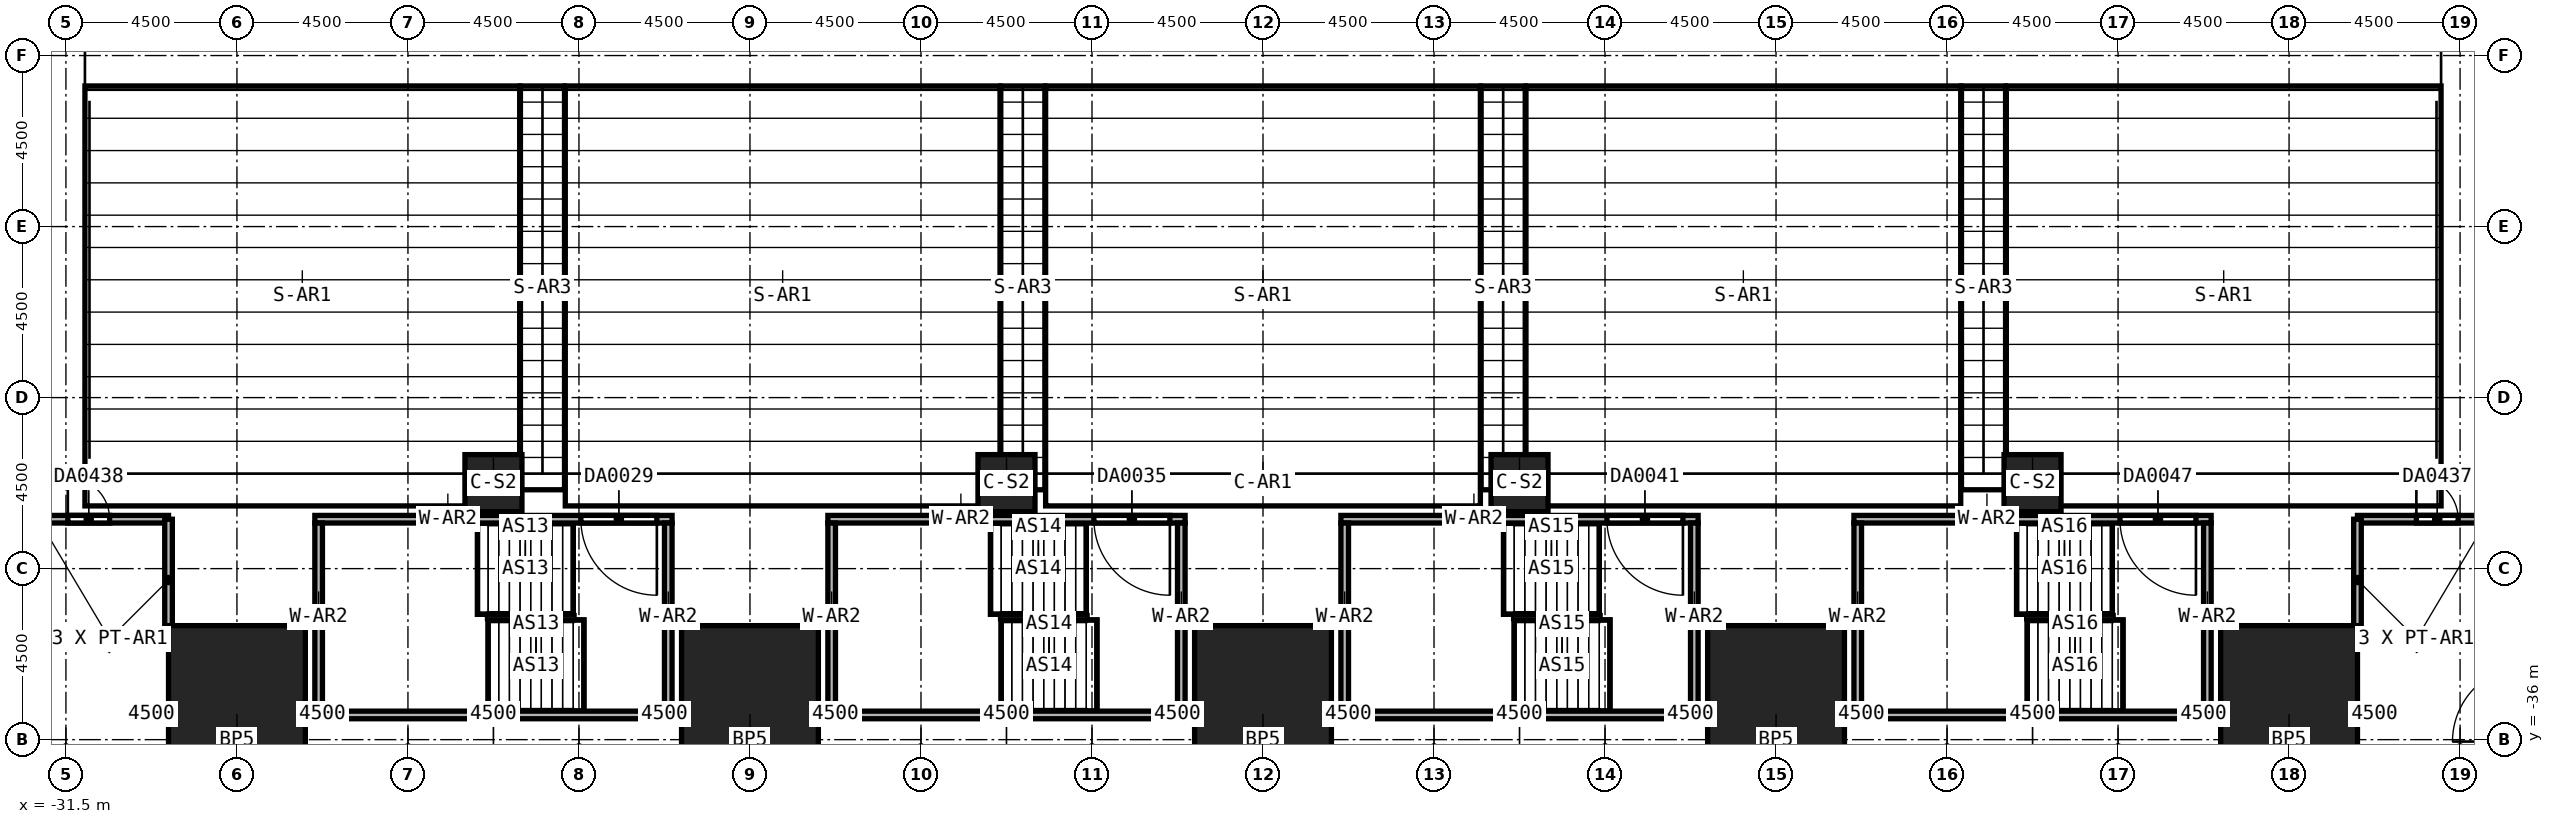
"""IFC4 building model, lengths in metres.
Left out: names, types, materials, properties, quantities, classifications, styles, units other than length and angle.
Written with IfcOpenShell. Run it as: python <this file> out.ifc"""

import sys

from ifc_helpers import new_model, si_unit, direction, frame, frame_2d, origin, origin_2d, place, context, subcontext, project, spatial, rectangle, hollow_rectangle, extrude, element, fill, save


model = new_model("IFC4")
c1 = context("Model", 3, precision=1e-05, world=origin(), true_north=direction((0.0, 1.0)))
c2 = subcontext(c1, "Body", "Model", "MODEL_VIEW")
j1 = project(units=[si_unit("LENGTHUNIT", "METRE"), si_unit("PLANEANGLEUNIT", "RADIAN")], contexts=[c1])
p1 = place(None, origin())
s1 = spatial("IfcSite", under=j1, at=p1, CompositionType="ELEMENT")
p2 = place(p1, origin())
s2 = spatial("IfcBuilding", under=s1, at=p2, CompositionType="ELEMENT")
p3 = place(p2, frame((0.0, 0.0, 31.0)))
s3 = spatial("IfcBuildingStorey", under=s2, at=p3, CompositionType="ELEMENT", Elevation=31.0)
for number, where, z_axis, x_axis in (
    (1, (-27.0, -36.0, 0.0), (0.0, 0.0, 1.0), (1.0, 0.0, 0.0)),
    (2, (-13.5, -36.0, 0.0), (0.0, 0.0, 1.0), (1.0, 0.0, 0.0)),
    (3, (0.0, -36.0, 0.0), (0.0, 0.0, 1.0), (1.0, 0.0, 0.0)),
    (4, (13.5, -36.0, 0.0), (0.0, 0.0, 1.0), (1.0, 0.0, 0.0)),
    (5, (27.0, -36.0, 0.0), (0.0, 0.0, 1.0), (1.0, 0.0, 0.0)),
):
    element("IfcColumn", number, at=place(p3, frame(where, z_axis=z_axis, x_axis=x_axis)), inside=s3, PredefinedType="COLUMN", context=c2, shape_type="SweptSolid", body=[
        extrude(rectangle(XDim=3.6, YDim=6.0, at=origin_2d()), origin(), (0.0, 0.0, 1.0), 6.0),
    ])
for number, where, z_axis, x_axis in (
    (6, (-20.25, -29.25, 0.0), (0.0, 0.0, 1.0), (1.0, 0.0, 0.0)),
    (7, (-6.75, -29.25, 0.0), (0.0, 0.0, 1.0), (1.0, 0.0, 0.0)),
    (8, (6.75, -29.25, 0.0), (0.0, 0.0, 1.0), (1.0, 0.0, 0.0)),
    (9, (20.25, -29.25, 0.0), (0.0, 0.0, 1.0), (1.0, 0.0, 0.0)),
):
    element("IfcColumn", number, at=place(p3, frame(where, z_axis=z_axis, x_axis=x_axis)), inside=s3, PredefinedType="COLUMN", context=c2, shape_type="SweptSolid", body=[
        extrude(rectangle(XDim=1.5, YDim=1.5, at=origin_2d()), origin(), (0.0, 0.0, 1.0), 6.0),
    ])
p4 = place(p3, frame((0.0, -29.255, 0.0), z_axis=(0.0, 0.0, 1.0), x_axis=(1.0, 0.0, 0.0)))
e10 = element("IfcColumn", 10, at=p4, inside=s3, PredefinedType="COLUMN", context=c2, shape_type="SweptSolid", body=[
    extrude(hollow_rectangle(XDim=0.5, YDim=0.6, WallThickness=0.03, at=origin_2d()), origin(), (0.0, 0.0, 1.0), 5.7),
])
p5 = place(p3, frame((-15.55, -30.2, 0.0), z_axis=(0.0, 0.0, 1.0), x_axis=(-1.0, 0.0, 0.0)))
e11 = element("IfcWall", 11, at=p5, inside=s3, PredefinedType="SOLIDWALL", context=c2, shape_type="SweptSolid", body=[
    extrude(rectangle(XDim=9.4, YDim=0.2, at=frame_2d((4.7, 0.0))), origin(), (0.0, 0.0, 1.0), 6.0),
])
p6 = place(p5, frame((0.4, 0.0, 0.0)))
e12 = element("IfcOpeningElement", 12, at=p6, cuts=e11, PredefinedType="OPENING", context=c2, shape_type="SweptSolid", body=[
    extrude(rectangle(XDim=2.0, YDim=2.4, at=frame_2d((1.0, 1.2))), frame((0.0, 0.1, 0.0), z_axis=(0.0, -1.0, 0.0), x_axis=(1.0, 0.0, 0.0)), (0.0, 0.0, 1.0), 0.2),
])
p7 = place(p3, frame((-24.95, -35.35, 0.0), z_axis=(0.0, 0.0, 1.0), x_axis=(1.0, 0.0, 0.0)))
e13 = element("IfcWall", 13, at=p7, inside=s3, PredefinedType="SOLIDWALL", context=c2, shape_type="SweptSolid", body=[
    extrude(rectangle(XDim=9.4, YDim=0.2, at=frame_2d((4.7, 0.0))), origin(), (0.0, 0.0, 1.0), 6.0),
])
for number, where, z_axis, x_axis in (
    (14, (-24.85, -35.25, 0.0), (0.0, 0.0, 1.0), (0.0, 1.0, 0.0)),
    (15, (-15.65, -35.25, 0.0), (0.0, 0.0, 1.0), (0.0, 1.0, 0.0)),
):
    element("IfcWall", number, at=place(p3, frame(where, z_axis=z_axis, x_axis=x_axis)), inside=s3, PredefinedType="SOLIDWALL", context=c2, shape_type="SweptSolid", body=[
        extrude(rectangle(XDim=4.95, YDim=0.2, at=frame_2d((2.475, 0.0))), origin(), (0.0, 0.0, 1.0), 6.0),
    ])
p8 = place(p3, frame((-2.05, -30.2, 0.0), z_axis=(0.0, 0.0, 1.0), x_axis=(-1.0, 0.0, 0.0)))
e16 = element("IfcWall", 16, at=p8, inside=s3, PredefinedType="SOLIDWALL", context=c2, shape_type="SweptSolid", body=[
    extrude(rectangle(XDim=9.4, YDim=0.2, at=frame_2d((4.7, 0.0))), origin(), (0.0, 0.0, 1.0), 6.0),
])
p9 = place(p8, frame((0.4, 0.0, 0.0)))
e17 = element("IfcOpeningElement", 17, at=p9, cuts=e16, PredefinedType="OPENING", context=c2, shape_type="SweptSolid", body=[
    extrude(rectangle(XDim=2.0, YDim=2.4, at=frame_2d((1.0, 1.2))), frame((0.0, 0.1, 0.0), z_axis=(0.0, -1.0, 0.0), x_axis=(1.0, 0.0, 0.0)), (0.0, 0.0, 1.0), 0.2),
])
p10 = place(p3, frame((-11.45, -35.35, 0.0), z_axis=(0.0, 0.0, 1.0), x_axis=(1.0, 0.0, 0.0)))
e18 = element("IfcWall", 18, at=p10, inside=s3, PredefinedType="SOLIDWALL", context=c2, shape_type="SweptSolid", body=[
    extrude(rectangle(XDim=9.4, YDim=0.2, at=frame_2d((4.7, 0.0))), origin(), (0.0, 0.0, 1.0), 6.0),
])
for number, where, z_axis, x_axis in (
    (19, (-11.35, -35.25, 0.0), (0.0, 0.0, 1.0), (0.0, 1.0, 0.0)),
    (20, (-2.15, -35.25, 0.0), (0.0, 0.0, 1.0), (0.0, 1.0, 0.0)),
):
    element("IfcWall", number, at=place(p3, frame(where, z_axis=z_axis, x_axis=x_axis)), inside=s3, PredefinedType="SOLIDWALL", context=c2, shape_type="SweptSolid", body=[
        extrude(rectangle(XDim=4.95, YDim=0.2, at=frame_2d((2.475, 0.0))), origin(), (0.0, 0.0, 1.0), 6.0),
    ])
p11 = place(p3, frame((11.45, -30.2, 0.0), z_axis=(0.0, 0.0, 1.0), x_axis=(-1.0, 0.0, 0.0)))
e21 = element("IfcWall", 21, at=p11, inside=s3, PredefinedType="SOLIDWALL", context=c2, shape_type="SweptSolid", body=[
    extrude(rectangle(XDim=9.4, YDim=0.2, at=frame_2d((4.7, 0.0))), origin(), (0.0, 0.0, 1.0), 6.0),
])
p12 = place(p11, frame((0.4, 0.0, 0.0)))
e22 = element("IfcOpeningElement", 22, at=p12, cuts=e21, PredefinedType="OPENING", context=c2, shape_type="SweptSolid", body=[
    extrude(rectangle(XDim=2.0, YDim=2.4, at=frame_2d((1.0, 1.2))), frame((0.0, 0.1, 0.0), z_axis=(0.0, -1.0, 0.0), x_axis=(1.0, 0.0, 0.0)), (0.0, 0.0, 1.0), 0.2),
])
p13 = place(p3, frame((2.05, -35.35, 0.0), z_axis=(0.0, 0.0, 1.0), x_axis=(1.0, 0.0, 0.0)))
e23 = element("IfcWall", 23, at=p13, inside=s3, PredefinedType="SOLIDWALL", context=c2, shape_type="SweptSolid", body=[
    extrude(rectangle(XDim=9.4, YDim=0.2, at=frame_2d((4.7, 0.0))), origin(), (0.0, 0.0, 1.0), 6.0),
])
for number, where, z_axis, x_axis in (
    (24, (2.15, -35.25, 0.0), (0.0, 0.0, 1.0), (0.0, 1.0, 0.0)),
    (25, (11.35, -35.25, 0.0), (0.0, 0.0, 1.0), (0.0, 1.0, 0.0)),
):
    element("IfcWall", number, at=place(p3, frame(where, z_axis=z_axis, x_axis=x_axis)), inside=s3, PredefinedType="SOLIDWALL", context=c2, shape_type="SweptSolid", body=[
        extrude(rectangle(XDim=4.95, YDim=0.2, at=frame_2d((2.475, 0.0))), origin(), (0.0, 0.0, 1.0), 6.0),
    ])
p14 = place(p3, frame((24.95, -30.2, 0.0), z_axis=(0.0, 0.0, 1.0), x_axis=(-1.0, 0.0, 0.0)))
e26 = element("IfcWall", 26, at=p14, inside=s3, PredefinedType="SOLIDWALL", context=c2, shape_type="SweptSolid", body=[
    extrude(rectangle(XDim=9.4, YDim=0.2, at=frame_2d((4.7, 0.0))), origin(), (0.0, 0.0, 1.0), 6.0),
])
p15 = place(p14, frame((0.4, 0.0, 0.0)))
e27 = element("IfcOpeningElement", 27, at=p15, cuts=e26, PredefinedType="OPENING", context=c2, shape_type="SweptSolid", body=[
    extrude(rectangle(XDim=2.0, YDim=2.4, at=frame_2d((1.0, 1.2))), frame((0.0, 0.1, 0.0), z_axis=(0.0, -1.0, 0.0), x_axis=(1.0, 0.0, 0.0)), (0.0, 0.0, 1.0), 0.2),
])
p16 = place(p3, frame((15.55, -35.35, 0.0), z_axis=(0.0, 0.0, 1.0), x_axis=(1.0, 0.0, 0.0)))
e28 = element("IfcWall", 28, at=p16, inside=s3, PredefinedType="SOLIDWALL", context=c2, shape_type="SweptSolid", body=[
    extrude(rectangle(XDim=9.4, YDim=0.2, at=frame_2d((4.7, 0.0))), origin(), (0.0, 0.0, 1.0), 6.0),
])
for number, where, z_axis, x_axis in (
    (29, (15.65, -35.25, 0.0), (0.0, 0.0, 1.0), (0.0, 1.0, 0.0)),
    (30, (24.85, -35.25, 0.0), (0.0, 0.0, 1.0), (0.0, 1.0, 0.0)),
):
    element("IfcWall", number, at=place(p3, frame(where, z_axis=z_axis, x_axis=x_axis)), inside=s3, PredefinedType="SOLIDWALL", context=c2, shape_type="SweptSolid", body=[
        extrude(rectangle(XDim=4.95, YDim=0.2, at=frame_2d((2.475, 0.0))), origin(), (0.0, 0.0, 1.0), 6.0),
    ])
p17 = place(p3, frame((28.8, -30.2, 0.0), z_axis=(0.0, 0.0, 1.0), x_axis=(1.0, 0.0, 0.0)))
e31 = element("IfcWall", 31, at=p17, inside=s3, PredefinedType="PARTITIONING", context=c2, shape_type="SweptSolid", body=[
    extrude(rectangle(XDim=4.2, YDim=0.2, at=frame_2d((2.1, 0.0))), origin(), (0.0, 0.0, 1.0), 5.7),
])
p18 = place(p17, frame((1.55, 0.0, 0.0)))
e32 = element("IfcOpeningElement", 32, at=p18, cuts=e31, PredefinedType="OPENING", context=c2, shape_type="SweptSolid", body=[
    extrude(rectangle(XDim=1.1, YDim=2.4, at=frame_2d((0.55, 1.2))), frame((0.0, 0.1, 0.0), z_axis=(0.0, -1.0, 0.0), x_axis=(1.0, 0.0, 0.0)), (0.0, 0.0, 1.0), 0.2),
])
p19 = place(p3, frame((28.8, -33.4, 0.0), z_axis=(0.0, 0.0, 1.0), x_axis=(0.0, 1.0, 0.0)))
e33 = element("IfcWall", 33, at=p19, inside=s3, PredefinedType="PARTITIONING", context=c2, shape_type="SweptSolid", body=[
    extrude(rectangle(XDim=3.2, YDim=0.2, at=frame_2d((1.6, 0.0))), origin(), (0.0, 0.0, 1.0), 5.7),
])
p20 = place(p3, frame((28.8, -33.4, 0.0), z_axis=(0.0, 0.0, 1.0), x_axis=(1.0, 0.0, 0.0)))
e34 = element("IfcWall", 34, at=p20, inside=s3, PredefinedType="PARTITIONING", context=c2, shape_type="SweptSolid", body=[
    extrude(rectangle(XDim=4.2, YDim=0.2, at=frame_2d((2.1, 0.0))), origin(), (0.0, 0.0, 1.0), 5.7),
])
p21 = place(p3, frame((-33.0, -30.2, 0.0), z_axis=(0.0, 0.0, 1.0), x_axis=(1.0, 0.0, 0.0)))
e35 = element("IfcWall", 35, at=p21, inside=s3, PredefinedType="PARTITIONING", context=c2, shape_type="SweptSolid", body=[
    extrude(rectangle(XDim=4.2, YDim=0.2, at=frame_2d((2.1, 0.0))), origin(), (0.0, 0.0, 1.0), 5.7),
])
p22 = place(p21, frame((1.55, 0.0, 0.0)))
e36 = element("IfcOpeningElement", 36, at=p22, cuts=e35, PredefinedType="OPENING", context=c2, shape_type="SweptSolid", body=[
    extrude(rectangle(XDim=1.1, YDim=2.4, at=frame_2d((0.55, 1.2))), frame((0.0, 0.1, 0.0), z_axis=(0.0, -1.0, 0.0), x_axis=(1.0, 0.0, 0.0)), (0.0, 0.0, 1.0), 0.2),
])
p23 = place(p3, frame((-28.8, -33.4, 0.0), z_axis=(0.0, 0.0, 1.0), x_axis=(0.0, 1.0, 0.0)))
e37 = element("IfcWall", 37, at=p23, inside=s3, PredefinedType="PARTITIONING", context=c2, shape_type="SweptSolid", body=[
    extrude(rectangle(XDim=3.2, YDim=0.2, at=frame_2d((1.6, 0.0))), origin(), (0.0, 0.0, 1.0), 5.7),
])
p24 = place(p3, frame((-33.0, -33.4, 0.0), z_axis=(0.0, 0.0, 1.0), x_axis=(1.0, 0.0, 0.0)))
e38 = element("IfcWall", 38, at=p24, inside=s3, PredefinedType="PARTITIONING", context=c2, shape_type="SweptSolid", body=[
    extrude(rectangle(XDim=4.2, YDim=0.2, at=frame_2d((2.1, 0.0))), origin(), (0.0, 0.0, 1.0), 5.7),
])
p25 = place(p6, origin())
e39 = element("IfcDoor", 39, at=p25, inside=s3, OperationType="DOUBLE_DOOR_SINGLE_SWING", PredefinedType="DOOR", context=c2, shape_type="SweptSolid", body=[
    extrude(rectangle(XDim=2.0, YDim=2.4, at=frame_2d((1.0, 1.2))), frame((0.0, 0.025, 0.0), z_axis=(0.0, -1.0, 0.0), x_axis=(1.0, 0.0, 0.0)), (0.0, 0.0, 1.0), 0.05),
])
fill(e12, e39)
p26 = place(p9, origin())
e40 = element("IfcDoor", 40, at=p26, inside=s3, OperationType="DOUBLE_DOOR_SINGLE_SWING", PredefinedType="DOOR", context=c2, shape_type="SweptSolid", body=[
    extrude(rectangle(XDim=2.0, YDim=2.4, at=frame_2d((1.0, 1.2))), frame((0.0, 0.025, 0.0), z_axis=(0.0, -1.0, 0.0), x_axis=(1.0, 0.0, 0.0)), (0.0, 0.0, 1.0), 0.05),
])
fill(e17, e40)
p27 = place(p12, origin())
e41 = element("IfcDoor", 41, at=p27, inside=s3, OperationType="DOUBLE_DOOR_SINGLE_SWING", PredefinedType="DOOR", context=c2, shape_type="SweptSolid", body=[
    extrude(rectangle(XDim=2.0, YDim=2.4, at=frame_2d((1.0, 1.2))), frame((0.0, 0.025, 0.0), z_axis=(0.0, -1.0, 0.0), x_axis=(1.0, 0.0, 0.0)), (0.0, 0.0, 1.0), 0.05),
])
fill(e22, e41)
p28 = place(p15, origin())
e42 = element("IfcDoor", 42, at=p28, inside=s3, OperationType="DOUBLE_DOOR_SINGLE_SWING", PredefinedType="DOOR", context=c2, shape_type="SweptSolid", body=[
    extrude(rectangle(XDim=2.0, YDim=2.4, at=frame_2d((1.0, 1.2))), frame((0.0, 0.025, 0.0), z_axis=(0.0, -1.0, 0.0), x_axis=(1.0, 0.0, 0.0)), (0.0, 0.0, 1.0), 0.05),
])
fill(e27, e42)
p29 = place(p18, origin())
e43 = element("IfcDoor", 43, at=p29, inside=s3, OperationType="DOUBLE_DOOR_SINGLE_SWING", PredefinedType="DOOR", context=c2, shape_type="SweptSolid", body=[
    extrude(rectangle(XDim=1.1, YDim=2.4, at=frame_2d((0.55, 1.2))), frame((0.0, 0.025, 0.0), z_axis=(0.0, -1.0, 0.0), x_axis=(1.0, 0.0, 0.0)), (0.0, 0.0, 1.0), 0.05),
])
fill(e32, e43)
p30 = place(p22, origin())
e44 = element("IfcDoor", 44, at=p30, inside=s3, OperationType="DOUBLE_DOOR_SINGLE_SWING", PredefinedType="DOOR", context=c2, shape_type="SweptSolid", body=[
    extrude(rectangle(XDim=1.1, YDim=2.4, at=frame_2d((0.55, 1.2))), frame((0.0, 0.025, 0.0), z_axis=(0.0, -1.0, 0.0), x_axis=(1.0, 0.0, 0.0)), (0.0, 0.0, 1.0), 0.05),
])
fill(e36, e44)
save(model, sys.argv[1])
